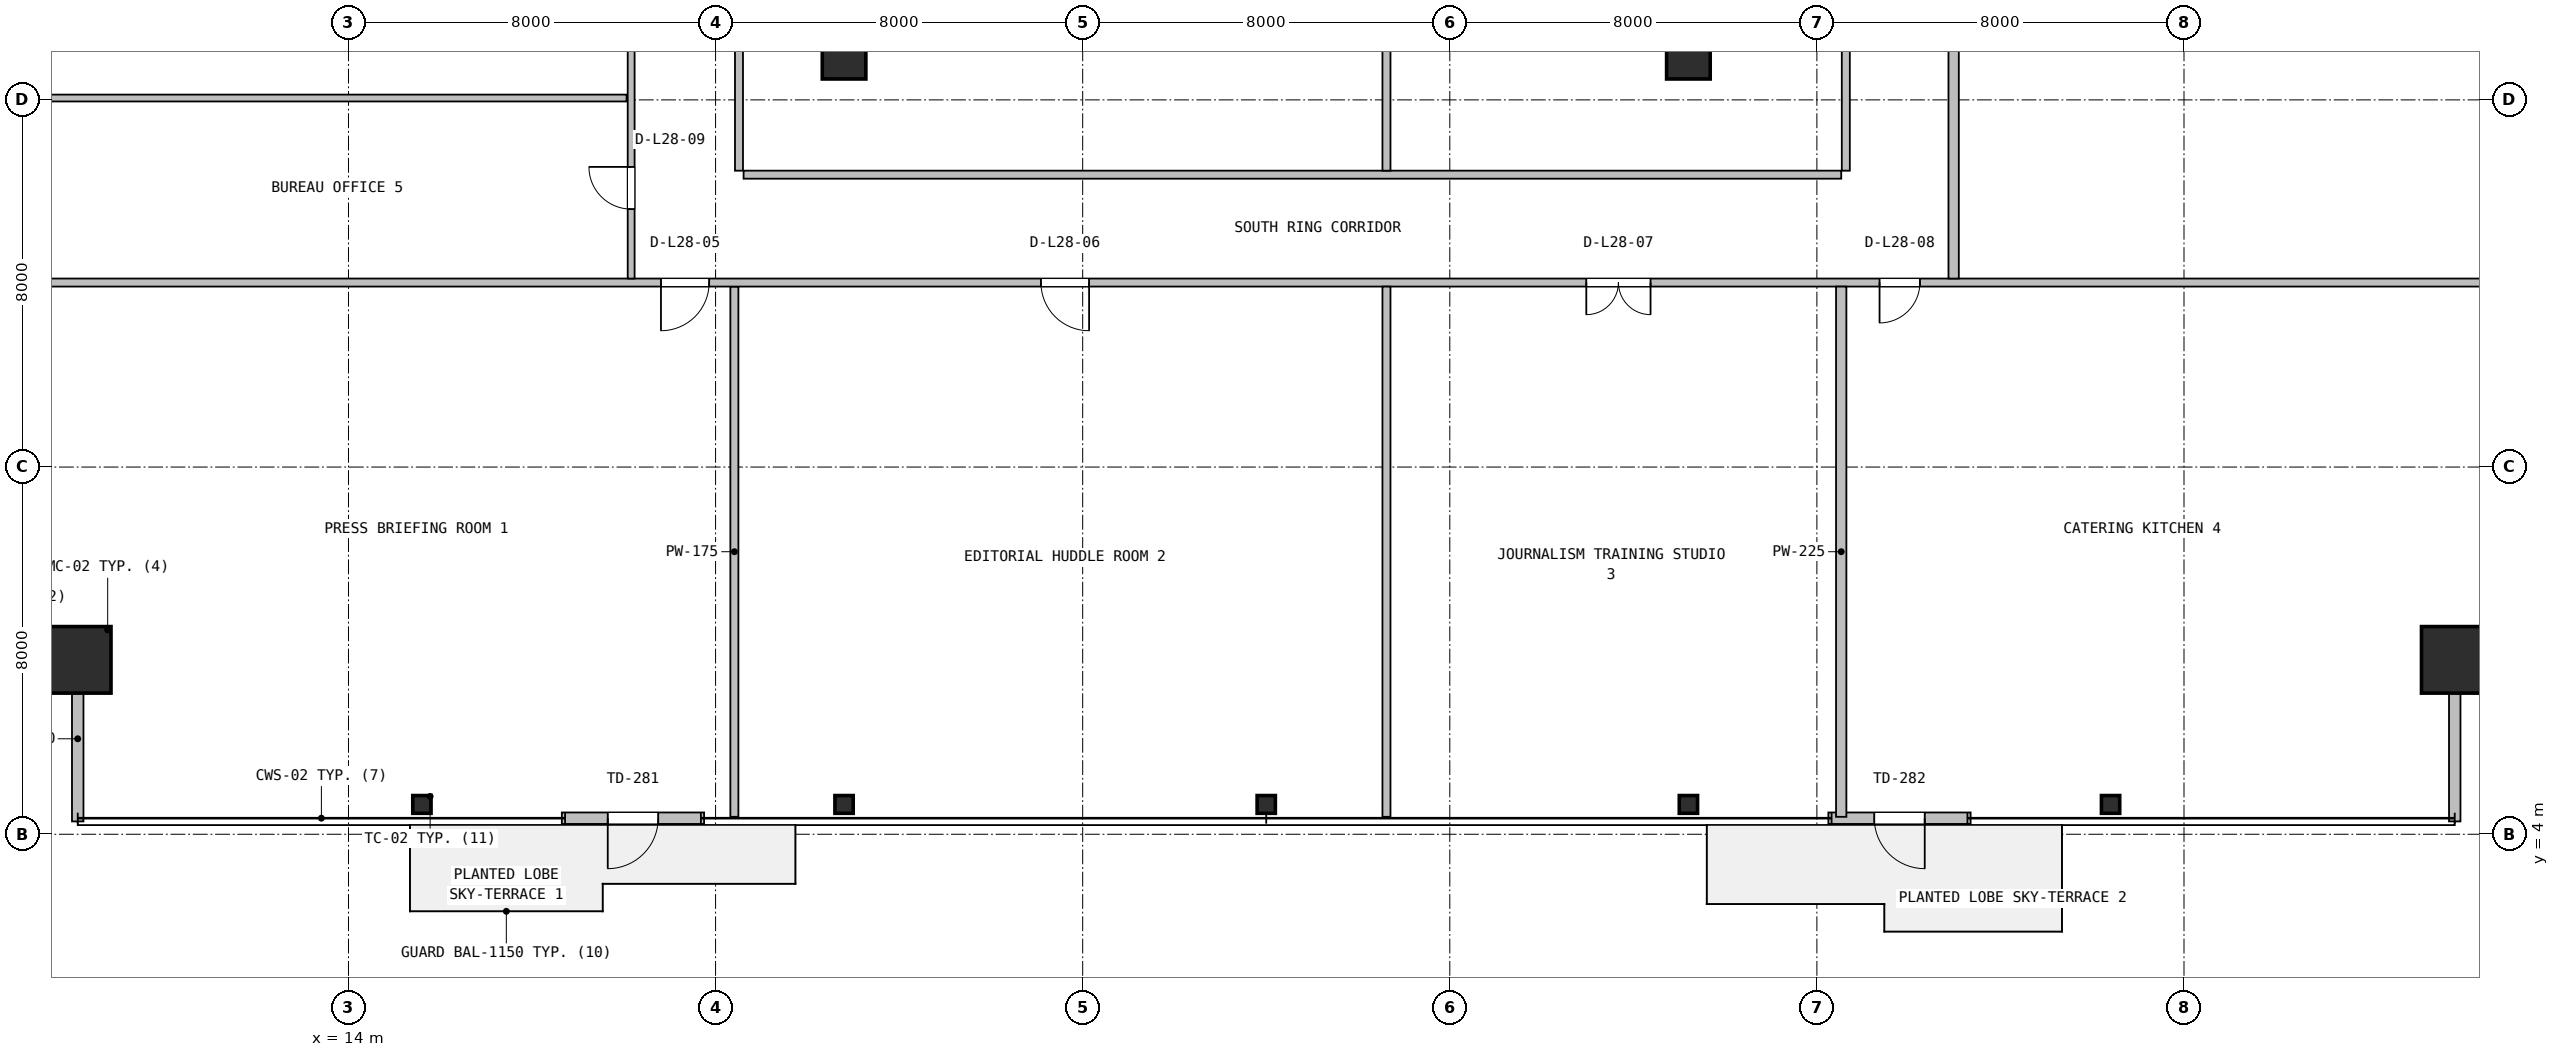
"""IFC4 building model, lengths in metres.
Left out: names, types, materials, properties, quantities, classifications, styles, units other than length and angle.
Written with IfcOpenShell. Run it as: python <this file> out.ifc"""

import sys

from ifc_helpers import new_model, si_unit, direction, frame, frame_2d, origin, origin_2d, place, context, subcontext, project, spatial, rectangle, hollow_rectangle, i_section, extrude, source, transform, mapped, element, fill, save


model = new_model("IFC4")
c1 = context("Model", 3, precision=1e-05, world=origin(), true_north=direction((0.0, 1.0)))
c2 = subcontext(c1, "Body", "Model", "MODEL_VIEW")
j1 = project(units=[si_unit("LENGTHUNIT", "METRE"), si_unit("PLANEANGLEUNIT", "RADIAN")], contexts=[c1])
p1 = place(None, origin())
s1 = spatial("IfcSite", under=j1, at=p1, CompositionType="ELEMENT")
p2 = place(p1, origin())
s2 = spatial("IfcBuilding", under=s1, at=p2, CompositionType="ELEMENT")
p3 = place(p2, frame((0.0, 0.0, 118.2)))
s3 = spatial("IfcBuildingStorey", under=s2, at=p3, CompositionType="ELEMENT", Elevation=118.2)
m1 = source(origin(), c2, "Body", "SweptSolid", [
    extrude(hollow_rectangle(XDim=1.45, YDim=1.45, WallThickness=0.055, at=origin_2d()), origin(), (0.0, 0.0, 1.0), 3.8),
])
for number, where, z_axis, x_axis in (
    (1, (8.1, 7.8, 0.0), (0.0, 0.0, 1.0), (1.0, 0.0, 0.0)),
    (2, (59.9, 7.8, 0.0), (0.0, 0.0, 1.0), (1.0, 0.0, 0.0)),
):
    element("IfcColumn", number, at=place(p3, frame(where, z_axis=z_axis, x_axis=x_axis)), inside=s3, PredefinedType="COLUMN", context=c2, shape_type="MappedRepresentation", body=[
        mapped(m1, transform((0.0, 0.0, 0.0), x_axis=(1.0, 0.0, 0.0), y_axis=(0.0, 1.0, 0.0), z_axis=(0.0, 0.0, 1.0), scale=1.0)),
    ])
m2 = source(origin(), c2, "Body", "SweptSolid", [
    extrude(i_section(OverallWidth=0.398, OverallDepth=0.387, WebThickness=0.021, FlangeThickness=0.033, FilletRadius=0.018, at=origin_2d()), origin(), (0.0, 0.0, 1.0), 3.8),
])
for number, where, z_axis, x_axis in (
    (3, (15.6, 4.65, 0.0), (0.0, 0.0, 1.0), (1.0, 0.0, 0.0)),
    (4, (24.8, 4.65, 0.0), (0.0, 0.0, 1.0), (1.0, 0.0, 0.0)),
    (5, (34.0, 4.65, 0.0), (0.0, 0.0, 1.0), (1.0, 0.0, 0.0)),
    (6, (43.2, 4.65, 0.0), (0.0, 0.0, 1.0), (1.0, 0.0, 0.0)),
    (7, (52.4, 4.65, 0.0), (0.0, 0.0, 1.0), (1.0, 0.0, 0.0)),
):
    element("IfcColumn", number, at=place(p3, frame(where, z_axis=z_axis, x_axis=x_axis)), inside=s3, PredefinedType="COLUMN", context=c2, shape_type="MappedRepresentation", body=[
        mapped(m2, transform((0.0, 0.0, 0.0), x_axis=(1.0, 0.0, 0.0), y_axis=(0.0, 1.0, 0.0), z_axis=(0.0, 0.0, 1.0), scale=1.0)),
    ])
m3 = source(origin(), c2, "Body", "SweptSolid", [
    extrude(rectangle(XDim=0.95, YDim=0.95, at=origin_2d()), origin(), (0.0, 0.0, 1.0), 3.8),
])
for number, where, z_axis, x_axis in (
    (8, (24.8, 20.93, 0.0), (0.0, 0.0, 1.0), (1.0, 0.0, 0.0)),
    (9, (43.2, 20.93, 0.0), (0.0, 0.0, 1.0), (1.0, 0.0, 0.0)),
):
    element("IfcColumn", number, at=place(p3, frame(where, z_axis=z_axis, x_axis=x_axis)), inside=s3, PredefinedType="COLUMN", context=c2, shape_type="MappedRepresentation", body=[
        mapped(m3, transform((0.0, 0.0, 0.0), x_axis=(1.0, 0.0, 0.0), y_axis=(0.0, 1.0, 0.0), z_axis=(0.0, 0.0, 1.0), scale=1.0)),
    ])
p4 = place(p3, frame((18.65, 4.35, 0.0), z_axis=(0.0, 0.0, 1.0), x_axis=(1.0, 0.0, 0.0)))
e10 = element("IfcWall", 10, at=p4, inside=s3, PredefinedType="SOLIDWALL", context=c2, shape_type="SweptSolid", body=[
    extrude(rectangle(XDim=3.1, YDim=0.25, at=frame_2d((1.55, 0.0))), origin(), (0.0, 0.0, 1.0), 3.53),
])
p5 = place(p4, frame((1.0, 0.0, 0.0)))
e11 = element("IfcOpeningElement", 11, at=p5, cuts=e10, PredefinedType="OPENING", context=c2, shape_type="SweptSolid", body=[
    extrude(rectangle(XDim=1.1, YDim=2.15, at=frame_2d((0.55, 1.075))), frame((0.0, 0.135, 0.0), z_axis=(0.0, -1.0, 0.0), x_axis=(1.0, 0.0, 0.0)), (0.0, 0.0, 1.0), 0.27),
])
p6 = place(p3, frame((46.25, 4.35, 0.0), z_axis=(0.0, 0.0, 1.0), x_axis=(1.0, 0.0, 0.0)))
e12 = element("IfcWall", 12, at=p6, inside=s3, PredefinedType="SOLIDWALL", context=c2, shape_type="SweptSolid", body=[
    extrude(rectangle(XDim=3.1, YDim=0.25, at=frame_2d((1.55, 0.0))), origin(), (0.0, 0.0, 1.0), 3.53),
])
p7 = place(p6, frame((1.0, 0.0, 0.0)))
e13 = element("IfcOpeningElement", 13, at=p7, cuts=e12, PredefinedType="OPENING", context=c2, shape_type="SweptSolid", body=[
    extrude(rectangle(XDim=1.1, YDim=2.15, at=frame_2d((0.55, 1.075))), frame((0.0, 0.135, 0.0), z_axis=(0.0, -1.0, 0.0), x_axis=(1.0, 0.0, 0.0)), (0.0, 0.0, 1.0), 0.27),
])
for number, where, z_axis, x_axis in (
    (14, (8.1, 4.28, 0.0), (0.0, 0.0, 1.0), (0.0, 1.0, 0.0)),
    (15, (59.9, 4.28, 0.0), (0.0, 0.0, 1.0), (0.0, 1.0, 0.0)),
):
    element("IfcWall", number, at=place(p3, frame(where, z_axis=z_axis, x_axis=x_axis)), inside=s3, PredefinedType="SOLIDWALL", context=c2, shape_type="SweptSolid", body=[
        extrude(rectangle(XDim=3.6, YDim=0.25, at=frame_2d((1.8, 0.0))), origin(), (0.0, 0.0, 1.0), 3.108),
    ])
p8 = place(p3, frame((22.41, 4.38, 0.0), z_axis=(0.0, 0.0, 1.0), x_axis=(0.0, 1.0, 0.0)))
e16 = element("IfcWall", 16, at=p8, inside=s3, PredefinedType="PARTITIONING", context=c2, shape_type="SweptSolid", body=[
    extrude(rectangle(XDim=11.552, YDim=0.175, at=frame_2d((5.776, 0.0))), origin(), (0.0, 0.0, 1.0), 3.108),
])
p9 = place(p3, frame((4.68, 16.02, 0.0), z_axis=(0.0, 0.0, 1.0), x_axis=(1.0, 0.0, 0.0)))
e17 = element("IfcWall", 17, at=p9, inside=s3, PredefinedType="PARTITIONING", context=c2, shape_type="SweptSolid", body=[
    extrude(rectangle(XDim=58.64, YDim=0.175, at=frame_2d((29.32, 0.0))), origin(), (0.0, 0.0, 1.0), 2.83),
])
p10 = place(p9, frame((16.13, 0.0, 0.0)))
e18 = element("IfcOpeningElement", 18, at=p10, cuts=e17, PredefinedType="OPENING", context=c2, shape_type="SweptSolid", body=[
    extrude(rectangle(XDim=1.05, YDim=2.1, at=frame_2d((0.525, 1.05))), frame((0.0, 0.098, 0.0), z_axis=(0.0, -1.0, 0.0), x_axis=(1.0, 0.0, 0.0)), (0.0, 0.0, 1.0), 0.195),
])
p11 = place(p9, frame((24.41, 0.0, 0.0)))
e19 = element("IfcOpeningElement", 19, at=p11, cuts=e17, PredefinedType="OPENING", context=c2, shape_type="SweptSolid", body=[
    extrude(rectangle(XDim=1.05, YDim=2.1, at=frame_2d((0.525, 1.05))), frame((0.0, 0.098, 0.0), z_axis=(0.0, -1.0, 0.0), x_axis=(1.0, 0.0, 0.0)), (0.0, 0.0, 1.0), 0.195),
])
p12 = place(p9, frame((36.295, 0.0, 0.0)))
e20 = element("IfcOpeningElement", 20, at=p12, cuts=e17, PredefinedType="OPENING", context=c2, shape_type="SweptSolid", body=[
    extrude(rectangle(XDim=1.4, YDim=2.12, at=frame_2d((0.7, 1.06))), frame((0.0, 0.098, 0.0), z_axis=(0.0, -1.0, 0.0), x_axis=(1.0, 0.0, 0.0)), (0.0, 0.0, 1.0), 0.195),
])
p13 = place(p9, frame((42.685, 0.0, 0.0)))
e21 = element("IfcOpeningElement", 21, at=p13, cuts=e17, PredefinedType="OPENING", context=c2, shape_type="SweptSolid", body=[
    extrude(rectangle(XDim=0.88, YDim=2.06, at=frame_2d((0.44, 1.03))), frame((0.0, 0.098, 0.0), z_axis=(0.0, -1.0, 0.0), x_axis=(1.0, 0.0, 0.0)), (0.0, 0.0, 1.0), 0.195),
])
p14 = place(p3, frame((36.62, 4.38, 0.0), z_axis=(0.0, 0.0, 1.0), x_axis=(0.0, 1.0, 0.0)))
e22 = element("IfcWall", 22, at=p14, inside=s3, PredefinedType="PARTITIONING", context=c2, shape_type="SweptSolid", body=[
    extrude(rectangle(XDim=11.552, YDim=0.175, at=frame_2d((5.776, 0.0))), origin(), (0.0, 0.0, 1.0), 3.108),
])
p15 = place(p3, frame((46.53, 4.38, 0.0), z_axis=(0.0, 0.0, 1.0), x_axis=(0.0, 1.0, 0.0)))
e23 = element("IfcWall", 23, at=p15, inside=s3, PredefinedType="PARTITIONING", context=c2, shape_type="SweptSolid", body=[
    extrude(rectangle(XDim=11.552, YDim=0.225, at=frame_2d((5.776, 0.0))), origin(), (0.0, 0.0, 1.0), 3.108),
])
p16 = place(p3, frame((20.16, 16.107, 0.0), z_axis=(0.0, 0.0, 1.0), x_axis=(0.0, 1.0, 0.0)))
e24 = element("IfcWall", 24, at=p16, inside=s3, PredefinedType="PARTITIONING", context=c2, shape_type="SweptSolid", body=[
    extrude(rectangle(XDim=17.156, YDim=0.15, at=frame_2d((8.578, 0.0))), origin(), (0.0, 0.0, 1.0), 3.222),
])
p17 = place(p16, frame((1.513, 0.0, 0.0)))
e25 = element("IfcOpeningElement", 25, at=p17, cuts=e24, PredefinedType="OPENING", context=c2, shape_type="SweptSolid", body=[
    extrude(rectangle(XDim=0.92, YDim=2.08, at=frame_2d((0.46, 1.04))), frame((0.0, 0.085, 0.0), z_axis=(0.0, -1.0, 0.0), x_axis=(1.0, 0.0, 0.0)), (0.0, 0.0, 1.0), 0.17),
])
p18 = place(p16, frame((6.388, 0.0, 0.0)))
e26 = element("IfcOpeningElement", 26, at=p18, cuts=e24, PredefinedType="OPENING", context=c2, shape_type="SweptSolid", body=[
    extrude(rectangle(XDim=1.0, YDim=2.1, at=frame_2d((0.5, 1.05))), frame((0.0, 0.085, 0.0), z_axis=(0.0, -1.0, 0.0), x_axis=(1.0, 0.0, 0.0)), (0.0, 0.0, 1.0), 0.17),
])
p19 = place(p3, frame((4.68, 20.04, 0.0), z_axis=(0.0, 0.0, 1.0), x_axis=(1.0, 0.0, 0.0)))
e27 = element("IfcWall", 27, at=p19, inside=s3, PredefinedType="PARTITIONING", context=c2, shape_type="SweptSolid", body=[
    extrude(rectangle(XDim=15.38, YDim=0.15, at=frame_2d((7.69, 0.0))), origin(), (0.0, 0.0, 1.0), 3.108),
])
p20 = place(p3, frame((22.61, 18.37, 0.0), z_axis=(0.0, 0.0, 1.0), x_axis=(1.0, 0.0, 0.0)))
e28 = element("IfcWall", 28, at=p20, inside=s3, PredefinedType="PARTITIONING", context=c2, shape_type="SweptSolid", body=[
    extrude(rectangle(XDim=23.92, YDim=0.175, at=frame_2d((11.96, 0.0))), origin(), (0.0, 0.0, 1.0), 2.83),
])
p21 = place(p3, frame((36.62, 18.457, 0.0), z_axis=(0.0, 0.0, 1.0), x_axis=(0.0, 1.0, 0.0)))
e29 = element("IfcWall", 29, at=p21, inside=s3, PredefinedType="PARTITIONING", context=c2, shape_type="SweptSolid", body=[
    extrude(rectangle(XDim=14.806, YDim=0.175, at=frame_2d((7.403, 0.0))), origin(), (0.0, 0.0, 1.0), 2.83),
])
p22 = place(p3, frame((22.51, 18.457, 0.0), z_axis=(0.0, 0.0, 1.0), x_axis=(0.0, 1.0, 0.0)))
e30 = element("IfcWall", 30, at=p22, inside=s3, PredefinedType="PARTITIONING", context=c2, shape_type="SweptSolid", body=[
    extrude(rectangle(XDim=14.806, YDim=0.175, at=frame_2d((7.403, 0.0))), origin(), (0.0, 0.0, 1.0), 3.222),
])
p23 = place(p22, frame((6.878, 0.0, 0.0)))
e31 = element("IfcOpeningElement", 31, at=p23, cuts=e30, PredefinedType="OPENING", context=c2, shape_type="SweptSolid", body=[
    extrude(rectangle(XDim=1.05, YDim=2.1, at=frame_2d((0.525, 1.05))), frame((0.0, 0.098, 0.0), z_axis=(0.0, -1.0, 0.0), x_axis=(1.0, 0.0, 0.0)), (0.0, 0.0, 1.0), 0.195),
])
p24 = place(p3, frame((46.63, 18.457, 0.0), z_axis=(0.0, 0.0, 1.0), x_axis=(0.0, 1.0, 0.0)))
e32 = element("IfcWall", 32, at=p24, inside=s3, PredefinedType="PARTITIONING", context=c2, shape_type="SweptSolid", body=[
    extrude(rectangle(XDim=14.806, YDim=0.175, at=frame_2d((7.403, 0.0))), origin(), (0.0, 0.0, 1.0), 3.222),
])
p25 = place(p24, frame((6.878, 0.0, 0.0)))
e33 = element("IfcOpeningElement", 33, at=p25, cuts=e32, PredefinedType="OPENING", context=c2, shape_type="SweptSolid", body=[
    extrude(rectangle(XDim=1.05, YDim=2.1, at=frame_2d((0.525, 1.05))), frame((0.0, 0.098, 0.0), z_axis=(0.0, -1.0, 0.0), x_axis=(1.0, 0.0, 0.0)), (0.0, 0.0, 1.0), 0.195),
])
p26 = place(p3, frame((48.98, 16.107, 0.0), z_axis=(0.0, 0.0, 1.0), x_axis=(0.0, 1.0, 0.0)))
e34 = element("IfcWall", 34, at=p26, inside=s3, PredefinedType="PARTITIONING", context=c2, shape_type="SweptSolid", body=[
    extrude(rectangle(XDim=17.131, YDim=0.225, at=frame_2d((8.565, 0.0))), origin(), (0.0, 0.0, 1.0), 3.222),
])
p27 = place(p26, frame((7.872, 0.0, 0.0)))
e35 = element("IfcOpeningElement", 35, at=p27, cuts=e34, PredefinedType="OPENING", context=c2, shape_type="SweptSolid", body=[
    extrude(rectangle(XDim=1.4, YDim=2.12, at=frame_2d((0.7, 1.06))), frame((0.0, 0.123, 0.0), z_axis=(0.0, -1.0, 0.0), x_axis=(1.0, 0.0, 0.0)), (0.0, 0.0, 1.0), 0.245),
])
m4 = source(origin(), c2, "Body", "SweptSolid", [
    extrude(rectangle(XDim=1.1, YDim=2.15, at=frame_2d((0.55, 1.075))), frame((0.0, 0.025, 0.0), z_axis=(0.0, -1.0, 0.0), x_axis=(1.0, 0.0, 0.0)), (0.0, 0.0, 1.0), 0.05),
])
p28 = place(p5, frame((1.1, 0.0, 0.0), z_axis=(0.0, 0.0, 1.0), x_axis=(-1.0, 0.0, 0.0)))
e36 = element("IfcDoor", 36, at=p28, inside=s3, OperationType="SINGLE_SWING_LEFT", PredefinedType="DOOR", context=c2, shape_type="MappedRepresentation", body=[
    mapped(m4, transform((0.0, 0.0, 0.0), x_axis=(1.0, 0.0, 0.0), y_axis=(0.0, 1.0, 0.0), z_axis=(0.0, 0.0, 1.0), scale=1.0)),
])
fill(e11, e36)
p29 = place(p7, frame((1.1, 0.0, 0.0), z_axis=(0.0, 0.0, 1.0), x_axis=(-1.0, 0.0, 0.0)))
e37 = element("IfcDoor", 37, at=p29, inside=s3, OperationType="SINGLE_SWING_RIGHT", PredefinedType="DOOR", context=c2, shape_type="MappedRepresentation", body=[
    mapped(m4, transform((0.0, 0.0, 0.0), x_axis=(1.0, 0.0, 0.0), y_axis=(0.0, 1.0, 0.0), z_axis=(0.0, 0.0, 1.0), scale=1.0)),
])
fill(e13, e37)
m5 = source(origin(), c2, "Body", "SweptSolid", [
    extrude(rectangle(XDim=1.05, YDim=2.1, at=frame_2d((0.525, 1.05))), frame((0.0, 0.025, 0.0), z_axis=(0.0, -1.0, 0.0), x_axis=(1.0, 0.0, 0.0)), (0.0, 0.0, 1.0), 0.05),
])
p30 = place(p10, frame((1.05, 0.0, 0.0), z_axis=(0.0, 0.0, 1.0), x_axis=(-1.0, 0.0, 0.0)))
e38 = element("IfcDoor", 38, at=p30, inside=s3, OperationType="SINGLE_SWING_LEFT", PredefinedType="DOOR", context=c2, shape_type="MappedRepresentation", body=[
    mapped(m5, transform((0.0, 0.0, 0.0), x_axis=(1.0, 0.0, 0.0), y_axis=(0.0, 1.0, 0.0), z_axis=(0.0, 0.0, 1.0), scale=1.0)),
])
fill(e18, e38)
p31 = place(p11, frame((1.05, 0.0, 0.0), z_axis=(0.0, 0.0, 1.0), x_axis=(-1.0, 0.0, 0.0)))
e39 = element("IfcDoor", 39, at=p31, inside=s3, OperationType="SINGLE_SWING_RIGHT", PredefinedType="DOOR", context=c2, shape_type="MappedRepresentation", body=[
    mapped(m5, transform((0.0, 0.0, 0.0), x_axis=(1.0, 0.0, 0.0), y_axis=(0.0, 1.0, 0.0), z_axis=(0.0, 0.0, 1.0), scale=1.0)),
])
fill(e19, e39)
m6 = source(origin(), c2, "Body", "SweptSolid", [
    extrude(rectangle(XDim=1.4, YDim=2.12, at=frame_2d((0.7, 1.06))), frame((0.0, 0.025, 0.0), z_axis=(0.0, -1.0, 0.0), x_axis=(1.0, 0.0, 0.0)), (0.0, 0.0, 1.0), 0.05),
])
p32 = place(p12, frame((1.4, 0.0, 0.0), z_axis=(0.0, 0.0, 1.0), x_axis=(-1.0, 0.0, 0.0)))
e40 = element("IfcDoor", 40, at=p32, inside=s3, OperationType="DOUBLE_DOOR_SINGLE_SWING", PredefinedType="DOOR", context=c2, shape_type="MappedRepresentation", body=[
    mapped(m6, transform((0.0, 0.0, 0.0), x_axis=(1.0, 0.0, 0.0), y_axis=(0.0, 1.0, 0.0), z_axis=(0.0, 0.0, 1.0), scale=1.0)),
])
fill(e20, e40)
m7 = source(origin(), c2, "Body", "SweptSolid", [
    extrude(rectangle(XDim=0.88, YDim=2.06, at=frame_2d((0.44, 1.03))), frame((0.0, 0.025, 0.0), z_axis=(0.0, -1.0, 0.0), x_axis=(1.0, 0.0, 0.0)), (0.0, 0.0, 1.0), 0.05),
])
p33 = place(p13, frame((0.88, 0.0, 0.0), z_axis=(0.0, 0.0, 1.0), x_axis=(-1.0, 0.0, 0.0)))
e41 = element("IfcDoor", 41, at=p33, inside=s3, OperationType="SINGLE_SWING_LEFT", PredefinedType="DOOR", context=c2, shape_type="MappedRepresentation", body=[
    mapped(m7, transform((0.0, 0.0, 0.0), x_axis=(1.0, 0.0, 0.0), y_axis=(0.0, 1.0, 0.0), z_axis=(0.0, 0.0, 1.0), scale=1.0)),
])
fill(e21, e41)
m8 = source(origin(), c2, "Body", "SweptSolid", [
    extrude(rectangle(XDim=0.92, YDim=2.08, at=frame_2d((0.46, 1.04))), frame((0.0, 0.025, 0.0), z_axis=(0.0, -1.0, 0.0), x_axis=(1.0, 0.0, 0.0)), (0.0, 0.0, 1.0), 0.05),
])
p34 = place(p17, origin())
e42 = element("IfcDoor", 42, at=p34, inside=s3, OperationType="SINGLE_SWING_RIGHT", PredefinedType="DOOR", context=c2, shape_type="MappedRepresentation", body=[
    mapped(m8, transform((0.0, 0.0, 0.0), x_axis=(1.0, 0.0, 0.0), y_axis=(0.0, 1.0, 0.0), z_axis=(0.0, 0.0, 1.0), scale=1.0)),
])
fill(e25, e42)
save(model, sys.argv[1])
